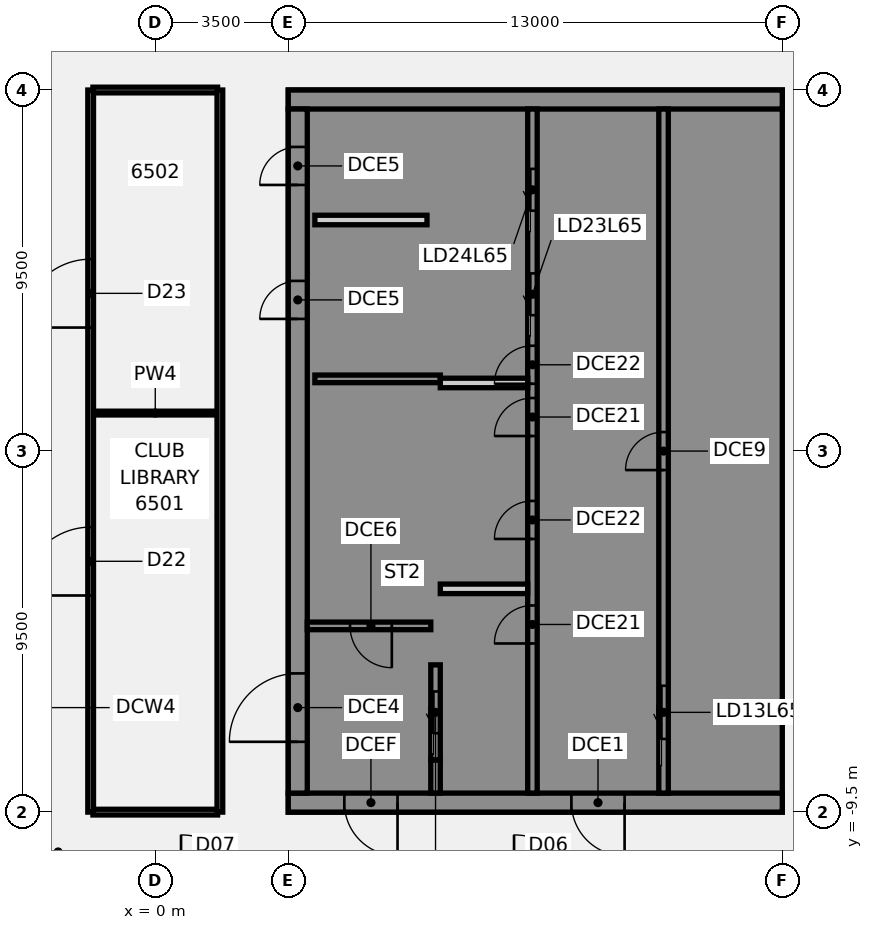
"""IFC4 building model, lengths in metres.
Left out: names, types, materials, properties, quantities, classifications, styles, units other than length and angle.
Written with IfcOpenShell. Run it as: python <this file> out.ifc"""

import sys

from ifc_helpers import new_model, si_unit, direction, frame, frame_2d, origin, place, context, subcontext, project, spatial, polyline, rectangle, outline, extrude, element, fill, save


model = new_model("IFC4")
c1 = context("Model", 3, precision=1e-05, world=origin(), true_north=direction((0.0, 1.0)))
c2 = subcontext(c1, "Body", "Model", "MODEL_VIEW")
j1 = project(units=[si_unit("LENGTHUNIT", "METRE"), si_unit("PLANEANGLEUNIT", "RADIAN")], contexts=[c1])
p1 = place(None, origin())
s1 = spatial("IfcSite", under=j1, at=p1, CompositionType="ELEMENT")
p2 = place(p1, origin())
s2 = spatial("IfcBuilding", under=s1, at=p2, CompositionType="ELEMENT")
p3 = place(p2, frame((0.0, 0.0, 256.8)))
s3 = spatial("IfcBuildingStorey", under=s2, at=p3, CompositionType="ELEMENT", Elevation=256.8)
p4 = place(p3, frame((-1.64, -9.5, 0.0), z_axis=(0.0, 0.0, 1.0), x_axis=(1.0, 0.0, 0.0)))
e1 = element("IfcWall", 1, at=p4, inside=s3, PredefinedType="PARTITIONING", context=c2, shape_type="SweptSolid", body=[
    extrude(rectangle(XDim=3.28, YDim=0.15, at=frame_2d((1.64, 0.0))), origin(), (0.0, 0.0, 1.0), 2.864),
])
p5 = place(p3, frame((-1.64, 1.0, 0.0), z_axis=(0.0, 0.0, 1.0), x_axis=(1.0, 0.0, 0.0)))
e2 = element("IfcWall", 2, at=p5, inside=s3, PredefinedType="PARTITIONING", context=c2, shape_type="SweptSolid", body=[
    extrude(rectangle(XDim=3.28, YDim=0.1, at=frame_2d((1.64, 0.0))), origin(), (0.0, 0.0, 1.0), 2.864),
])
p6 = place(p3, frame((-1.64, 9.5, 0.0), z_axis=(0.0, 0.0, 1.0), x_axis=(1.0, 0.0, 0.0)))
e3 = element("IfcWall", 3, at=p6, inside=s3, PredefinedType="PARTITIONING", context=c2, shape_type="SweptSolid", body=[
    extrude(rectangle(XDim=3.28, YDim=0.15, at=frame_2d((1.64, 0.0))), origin(), (0.0, 0.0, 1.0), 2.864),
])
p7 = place(p3, frame((-1.7, -9.5, 0.0), z_axis=(0.0, 0.0, 1.0), x_axis=(0.0, 1.0, 0.0)))
e4 = element("IfcWall", 4, at=p7, inside=s3, PredefinedType="PARTITIONING", context=c2, shape_type="SweptSolid", body=[
    extrude(rectangle(XDim=19.0, YDim=0.15, at=frame_2d((9.5, 0.0))), origin(), (0.0, 0.0, 1.0), 2.864),
])
p8 = place(p7, frame((5.7, 0.0, 0.0)))
e5 = element("IfcOpeningElement", 5, at=p8, cuts=e4, PredefinedType="OPENING", context=c2, shape_type="SweptSolid", body=[
    extrude(rectangle(XDim=1.8, YDim=2.1, at=frame_2d((0.9, 1.05))), frame((0.0, 0.085, 0.0), z_axis=(0.0, -1.0, 0.0), x_axis=(1.0, 0.0, 0.0)), (0.0, 0.0, 1.0), 0.17),
])
p9 = place(p7, frame((12.75, 0.0, 0.0)))
e6 = element("IfcOpeningElement", 6, at=p9, cuts=e4, PredefinedType="OPENING", context=c2, shape_type="SweptSolid", body=[
    extrude(rectangle(XDim=1.8, YDim=2.1, at=frame_2d((0.9, 1.05))), frame((0.0, 0.085, 0.0), z_axis=(0.0, -1.0, 0.0), x_axis=(1.0, 0.0, 0.0)), (0.0, 0.0, 1.0), 0.17),
])
p10 = place(p3, frame((1.7, -9.5, 0.0), z_axis=(0.0, 0.0, 1.0), x_axis=(0.0, 1.0, 0.0)))
e7 = element("IfcWall", 7, at=p10, inside=s3, PredefinedType="PARTITIONING", context=c2, shape_type="SweptSolid", body=[
    extrude(rectangle(XDim=19.0, YDim=0.15, at=frame_2d((9.5, 0.0))), origin(), (0.0, 0.0, 1.0), 2.864),
])
p11 = place(p3, frame((16.5, -9.25, 0.0), z_axis=(0.0, 0.0, 1.0), x_axis=(-1.0, 0.0, 0.0)))
e8 = element("IfcWall", 8, at=p11, inside=s3, PredefinedType="SHEAR", context=c2, shape_type="SweptSolid", body=[
    extrude(rectangle(XDim=13.0, YDim=0.5, at=frame_2d((6.5, 0.0))), origin(), (0.0, 0.0, 1.0), 3.46),
])
p12 = place(p11, frame((4.15, 0.0, 0.0)))
e9 = element("IfcOpeningElement", 9, at=p12, cuts=e8, PredefinedType="OPENING", context=c2, shape_type="SweptSolid", body=[
    extrude(rectangle(XDim=1.4, YDim=2.1, at=frame_2d((0.7, 1.05))), frame((0.0, 0.26, 0.0), z_axis=(0.0, -1.0, 0.0), x_axis=(1.0, 0.0, 0.0)), (0.0, 0.0, 1.0), 0.52),
])
p13 = place(p11, frame((10.125, 0.0, 0.0)))
e10 = element("IfcOpeningElement", 10, at=p13, cuts=e8, PredefinedType="OPENING", context=c2, shape_type="SweptSolid", body=[
    extrude(rectangle(XDim=1.4, YDim=2.1, at=frame_2d((0.7, 1.05))), frame((0.0, 0.26, 0.0), z_axis=(0.0, -1.0, 0.0), x_axis=(1.0, 0.0, 0.0)), (0.0, 0.0, 1.0), 0.52),
])
p14 = place(p3, origin())
e11 = element("IfcWall", 11, at=p14, inside=s3, PredefinedType="SHEAR", context=c2, shape_type="SweptSolid", body=[
    extrude(outline(polyline([(13.5, -8.125), (13.5, -9.0), (16.0, -9.0), (16.5, -9.0), (16.5, 9.0), (16.0, 9.0), (13.5, 9.0), (13.5, 8.125), (16.0, 8.125), (16.0, 5.625), (13.5, 5.625), (13.5, 5.375), (16.0, 5.375), (16.0, -5.375), (13.5, -5.375), (13.5, -5.625), (16.0, -5.625), (16.0, -8.125), (13.5, -8.125)])), origin(), (0.0, 0.0, 1.0), 3.46),
])
p15 = place(p3, frame((16.5, 9.25, 0.0), z_axis=(0.0, 0.0, 1.0), x_axis=(-1.0, 0.0, 0.0)))
e12 = element("IfcWall", 12, at=p15, inside=s3, PredefinedType="SHEAR", context=c2, shape_type="SweptSolid", body=[
    extrude(rectangle(XDim=13.0, YDim=0.5, at=frame_2d((6.5, 0.0))), origin(), (0.0, 0.0, 1.0), 3.46),
])
p16 = place(p3, origin())
e13 = element("IfcWall", 13, at=p16, inside=s3, PredefinedType="SHEAR", context=c2, shape_type="SweptSolid", body=[
    extrude(outline(polyline([(9.8, -5.375), (7.5, -5.375), (7.5, 2.625), (9.8, 2.625), (9.8, 2.875), (7.5, 2.875), (7.5, 5.375), (9.8, 5.375), (9.8, 5.625), (7.5, 5.625), (7.5, 8.125), (9.8, 8.125), (9.8, 9.0), (7.5, 9.0), (7.25, 9.0), (7.25, -5.625), (7.5, -5.625), (9.8, -5.625), (9.8, -5.375)])), origin(), (0.0, 0.0, 1.0), 3.46),
])
p17 = place(p3, origin())
e14 = element("IfcWall", 14, at=p17, inside=s3, PredefinedType="SHEAR", context=c2, shape_type="SweptSolid", body=[
    extrude(outline(polyline([(7.5, -8.125), (7.5, -9.0), (9.8, -9.0), (9.8, -8.125), (9.8, -5.625), (9.55, -5.625), (9.55, -8.125), (7.5, -8.125)])), origin(), (0.0, 0.0, 1.0), 3.46),
])
p18 = place(p3, frame((7.375, -9.0, 0.0), z_axis=(0.0, 0.0, 1.0), x_axis=(0.0, 1.0, 0.0)))
e15 = element("IfcWall", 15, at=p18, inside=s3, PredefinedType="SHEAR", context=c2, shape_type="SweptSolid", body=[
    extrude(rectangle(XDim=0.875, YDim=0.25, at=frame_2d((0.438, 0.0))), origin(), (0.0, 0.0, 1.0), 3.46),
])
p19 = place(p3, frame((7.5, 1.9, 0.0), z_axis=(0.0, 0.0, 1.0), x_axis=(-1.0, 0.0, 0.0)))
e16 = element("IfcWall", 16, at=p19, inside=s3, PredefinedType="SHEAR", context=c2, shape_type="SweptSolid", body=[
    extrude(rectangle(XDim=3.3, YDim=0.2, at=frame_2d((1.65, 0.0))), origin(), (0.0, 0.0, 1.0), 3.46),
])
p20 = place(p3, frame((13.375, -9.0, 0.0), z_axis=(0.0, 0.0, 1.0), x_axis=(0.0, 1.0, 0.0)))
e17 = element("IfcWall", 17, at=p20, inside=s3, PredefinedType="SHEAR", context=c2, shape_type="SweptSolid", body=[
    extrude(rectangle(XDim=18.0, YDim=0.25, at=frame_2d((9.0, 0.0))), origin(), (0.0, 0.0, 1.0), 3.46),
])
p21 = place(p20, frame((1.425, 0.0, 0.0)))
e18 = element("IfcOpeningElement", 18, at=p21, cuts=e17, PredefinedType="OPENING", context=c2, shape_type="SweptSolid", body=[
    extrude(rectangle(XDim=1.4, YDim=2.1, at=frame_2d((0.7, 1.05))), frame((0.0, 0.135, 0.0), z_axis=(0.0, -1.0, 0.0), x_axis=(1.0, 0.0, 0.0)), (0.0, 0.0, 1.0), 0.27),
])
p22 = place(p20, frame((8.5, 0.0, 0.0)))
e19 = element("IfcOpeningElement", 19, at=p22, cuts=e17, PredefinedType="OPENING", context=c2, shape_type="SweptSolid", body=[
    extrude(rectangle(XDim=1.0, YDim=2.1, at=frame_2d((0.5, 1.05))), frame((0.0, 0.135, 0.0), z_axis=(0.0, -1.0, 0.0), x_axis=(1.0, 0.0, 0.0)), (0.0, 0.0, 1.0), 0.27),
])
p23 = place(p3, frame((9.925, -9.0, 0.0), z_axis=(0.0, 0.0, 1.0), x_axis=(0.0, 1.0, 0.0)))
e20 = element("IfcWall", 20, at=p23, inside=s3, PredefinedType="SHEAR", context=c2, shape_type="SweptSolid", body=[
    extrude(rectangle(XDim=18.0, YDim=0.25, at=frame_2d((9.0, 0.0))), origin(), (0.0, 0.0, 1.0), 3.46),
])
p24 = place(p23, frame((12.575, 0.0, 0.0)))
e21 = element("IfcOpeningElement", 21, at=p24, cuts=e20, PredefinedType="OPENING", context=c2, shape_type="SweptSolid", body=[
    extrude(rectangle(XDim=1.1, YDim=2.1, at=frame_2d((0.55, 1.05))), frame((0.0, 0.135, 0.0), z_axis=(0.0, -1.0, 0.0), x_axis=(1.0, 0.0, 0.0)), (0.0, 0.0, 1.0), 0.27),
])
p25 = place(p23, frame((15.325, 0.0, 0.0)))
e22 = element("IfcOpeningElement", 22, at=p25, cuts=e20, PredefinedType="OPENING", context=c2, shape_type="SweptSolid", body=[
    extrude(rectangle(XDim=1.1, YDim=2.1, at=frame_2d((0.55, 1.05))), frame((0.0, 0.135, 0.0), z_axis=(0.0, -1.0, 0.0), x_axis=(1.0, 0.0, 0.0)), (0.0, 0.0, 1.0), 0.27),
])
p26 = place(p23, frame((3.938, 0.0, 0.0)))
e23 = element("IfcOpeningElement", 23, at=p26, cuts=e20, PredefinedType="OPENING", context=c2, shape_type="SweptSolid", body=[
    extrude(rectangle(XDim=1.0, YDim=2.1, at=frame_2d((0.5, 1.05))), frame((0.0, 0.135, 0.0), z_axis=(0.0, -1.0, 0.0), x_axis=(1.0, 0.0, 0.0)), (0.0, 0.0, 1.0), 0.27),
])
p27 = place(p23, frame((6.688, 0.0, 0.0)))
e24 = element("IfcOpeningElement", 24, at=p27, cuts=e20, PredefinedType="OPENING", context=c2, shape_type="SweptSolid", body=[
    extrude(rectangle(XDim=1.0, YDim=2.1, at=frame_2d((0.5, 1.05))), frame((0.0, 0.135, 0.0), z_axis=(0.0, -1.0, 0.0), x_axis=(1.0, 0.0, 0.0)), (0.0, 0.0, 1.0), 0.27),
])
p28 = place(p23, frame((9.396, 0.0, 0.0)))
e25 = element("IfcOpeningElement", 25, at=p28, cuts=e20, PredefinedType="OPENING", context=c2, shape_type="SweptSolid", body=[
    extrude(rectangle(XDim=1.0, YDim=2.1, at=frame_2d((0.5, 1.05))), frame((0.0, 0.135, 0.0), z_axis=(0.0, -1.0, 0.0), x_axis=(1.0, 0.0, 0.0)), (0.0, 0.0, 1.0), 0.27),
])
p29 = place(p23, frame((10.771, 0.0, 0.0)))
e26 = element("IfcOpeningElement", 26, at=p29, cuts=e20, PredefinedType="OPENING", context=c2, shape_type="SweptSolid", body=[
    extrude(rectangle(XDim=1.0, YDim=2.1, at=frame_2d((0.5, 1.05))), frame((0.0, 0.135, 0.0), z_axis=(0.0, -1.0, 0.0), x_axis=(1.0, 0.0, 0.0)), (0.0, 0.0, 1.0), 0.27),
])
p30 = place(p3, frame((7.375, -8.125, 0.0), z_axis=(0.0, 0.0, 1.0), x_axis=(0.0, 1.0, 0.0)))
e27 = element("IfcWall", 27, at=p30, inside=s3, PredefinedType="SHEAR", context=c2, shape_type="SweptSolid", body=[
    extrude(rectangle(XDim=2.5, YDim=0.25, at=frame_2d((1.25, 0.0))), origin(), (0.0, 0.0, 1.0), 3.46),
])
p31 = place(p30, frame((0.7, 0.0, 0.0)))
e28 = element("IfcOpeningElement", 28, at=p31, cuts=e27, PredefinedType="OPENING", context=c2, shape_type="SweptSolid", body=[
    extrude(rectangle(XDim=1.1, YDim=2.1, at=frame_2d((0.55, 1.05))), frame((0.0, 0.135, 0.0), z_axis=(0.0, -1.0, 0.0), x_axis=(1.0, 0.0, 0.0)), (0.0, 0.0, 1.0), 0.27),
])
p32 = place(p3, frame((3.75, -9.0, 0.0), z_axis=(0.0, 0.0, 1.0), x_axis=(0.0, 1.0, 0.0)))
e29 = element("IfcWall", 29, at=p32, inside=s3, PredefinedType="SHEAR", context=c2, shape_type="SweptSolid", body=[
    extrude(rectangle(XDim=18.0, YDim=0.5, at=frame_2d((9.0, 0.0))), origin(), (0.0, 0.0, 1.0), 3.46),
])
p33 = place(p32, frame((1.35, 0.0, 0.0)))
e30 = element("IfcOpeningElement", 30, at=p33, cuts=e29, PredefinedType="OPENING", context=c2, shape_type="SweptSolid", body=[
    extrude(rectangle(XDim=1.8, YDim=2.1, at=frame_2d((0.9, 1.05))), frame((0.0, 0.26, 0.0), z_axis=(0.0, -1.0, 0.0), x_axis=(1.0, 0.0, 0.0)), (0.0, 0.0, 1.0), 0.52),
])
p34 = place(p32, frame((12.478, 0.0, 0.0)))
e31 = element("IfcOpeningElement", 31, at=p34, cuts=e29, PredefinedType="OPENING", context=c2, shape_type="SweptSolid", body=[
    extrude(rectangle(XDim=1.0, YDim=2.1, at=frame_2d((0.5, 1.05))), frame((0.0, 0.26, 0.0), z_axis=(0.0, -1.0, 0.0), x_axis=(1.0, 0.0, 0.0)), (0.0, 0.0, 1.0), 0.52),
])
p35 = place(p32, frame((16.002, 0.0, 0.0)))
e32 = element("IfcOpeningElement", 32, at=p35, cuts=e29, PredefinedType="OPENING", context=c2, shape_type="SweptSolid", body=[
    extrude(rectangle(XDim=1.0, YDim=2.1, at=frame_2d((0.5, 1.05))), frame((0.0, 0.26, 0.0), z_axis=(0.0, -1.0, 0.0), x_axis=(1.0, 0.0, 0.0)), (0.0, 0.0, 1.0), 0.52),
])
p36 = place(p3, frame((7.15, 6.08, 0.0), z_axis=(0.0, 0.0, 1.0), x_axis=(-1.0, 0.0, 0.0)))
e33 = element("IfcWall", 33, at=p36, inside=s3, PredefinedType="PARTITIONING", context=c2, shape_type="SweptSolid", body=[
    extrude(rectangle(XDim=2.95, YDim=0.25, at=frame_2d((1.475, 0.0))), origin(), (0.0, 0.0, 1.0), 3.46),
])
p37 = place(p3, frame((7.25, -4.6, 0.0), z_axis=(0.0, 0.0, 1.0), x_axis=(-1.0, 0.0, 0.0)))
e34 = element("IfcWall", 34, at=p37, inside=s3, PredefinedType="SHEAR", context=c2, shape_type="SweptSolid", body=[
    extrude(rectangle(XDim=3.25, YDim=0.2, at=frame_2d((1.625, 0.0))), origin(), (0.0, 0.0, 1.0), 3.46),
])
p38 = place(p37, frame((1.025, 0.0, 0.0)))
e35 = element("IfcOpeningElement", 35, at=p38, cuts=e34, PredefinedType="OPENING", context=c2, shape_type="SweptSolid", body=[
    extrude(rectangle(XDim=1.1, YDim=2.1, at=frame_2d((0.55, 1.05))), frame((0.0, 0.11, 0.0), z_axis=(0.0, -1.0, 0.0), x_axis=(1.0, 0.0, 0.0)), (0.0, 0.0, 1.0), 0.22),
])
for number, where, z_axis, x_axis in (
    (36, (9.8, -3.625, 0.0), (0.0, 0.0, 1.0), (-1.0, 0.0, 0.0)),
    (37, (9.8, 1.792, 0.0), (0.0, 0.0, 1.0), (-1.0, 0.0, 0.0)),
):
    element("IfcWall", number, at=place(p3, frame(where, z_axis=z_axis, x_axis=x_axis)), inside=s3, PredefinedType="PARTITIONING", context=c2, shape_type="SweptSolid", body=[
        extrude(rectangle(XDim=2.3, YDim=0.25, at=frame_2d((1.15, 0.0))), origin(), (0.0, 0.0, 1.0), 3.46),
    ])
p39 = place(p8, frame((1.8, 0.0, 0.0), z_axis=(0.0, 0.0, 1.0), x_axis=(-1.0, 0.0, 0.0)))
e38 = element("IfcDoor", 38, at=p39, inside=s3, OperationType="DOUBLE_DOOR_SINGLE_SWING", PredefinedType="DOOR", context=c2, shape_type="SweptSolid", body=[
    extrude(rectangle(XDim=1.8, YDim=2.1, at=frame_2d((0.9, 1.05))), frame((0.0, 0.025, 0.0), z_axis=(0.0, -1.0, 0.0), x_axis=(1.0, 0.0, 0.0)), (0.0, 0.0, 1.0), 0.05),
])
fill(e5, e38)
p40 = place(p9, frame((1.8, 0.0, 0.0), z_axis=(0.0, 0.0, 1.0), x_axis=(-1.0, 0.0, 0.0)))
e39 = element("IfcDoor", 39, at=p40, inside=s3, OperationType="DOUBLE_DOOR_SINGLE_SWING", PredefinedType="DOOR", context=c2, shape_type="SweptSolid", body=[
    extrude(rectangle(XDim=1.8, YDim=2.1, at=frame_2d((0.9, 1.05))), frame((0.0, 0.025, 0.0), z_axis=(0.0, -1.0, 0.0), x_axis=(1.0, 0.0, 0.0)), (0.0, 0.0, 1.0), 0.05),
])
fill(e6, e39)
p41 = place(p12, origin())
e40 = element("IfcDoor", 40, at=p41, inside=s3, OperationType="SINGLE_SWING_LEFT", PredefinedType="DOOR", context=c2, shape_type="SweptSolid", body=[
    extrude(rectangle(XDim=1.4, YDim=2.1, at=frame_2d((0.7, 1.05))), frame((0.0, 0.025, 0.0), z_axis=(0.0, -1.0, 0.0), x_axis=(1.0, 0.0, 0.0)), (0.0, 0.0, 1.0), 0.05),
])
fill(e9, e40)
p42 = place(p13, origin())
e41 = element("IfcDoor", 41, at=p42, inside=s3, OperationType="SINGLE_SWING_LEFT", PredefinedType="DOOR", context=c2, shape_type="SweptSolid", body=[
    extrude(rectangle(XDim=1.4, YDim=2.1, at=frame_2d((0.7, 1.05))), frame((0.0, 0.025, 0.0), z_axis=(0.0, -1.0, 0.0), x_axis=(1.0, 0.0, 0.0)), (0.0, 0.0, 1.0), 0.05),
])
fill(e10, e41)
p43 = place(p33, origin())
e42 = element("IfcDoor", 42, at=p43, inside=s3, OperationType="SINGLE_SWING_LEFT", PredefinedType="DOOR", context=c2, shape_type="SweptSolid", body=[
    extrude(rectangle(XDim=1.8, YDim=2.1, at=frame_2d((0.9, 1.05))), frame((0.0, 0.025, 0.0), z_axis=(0.0, -1.0, 0.0), x_axis=(1.0, 0.0, 0.0)), (0.0, 0.0, 1.0), 0.05),
])
fill(e30, e42)
p44 = place(p34, origin())
e43 = element("IfcDoor", 43, at=p44, inside=s3, OperationType="SINGLE_SWING_LEFT", PredefinedType="DOOR", context=c2, shape_type="SweptSolid", body=[
    extrude(rectangle(XDim=1.0, YDim=2.1, at=frame_2d((0.5, 1.05))), frame((0.0, -0.175, 0.0), z_axis=(0.0, -1.0, 0.0), x_axis=(1.0, 0.0, 0.0)), (0.0, 0.0, 1.0), 0.05),
])
fill(e31, e43)
p45 = place(p35, origin())
e44 = element("IfcDoor", 44, at=p45, inside=s3, OperationType="SINGLE_SWING_LEFT", PredefinedType="DOOR", context=c2, shape_type="SweptSolid", body=[
    extrude(rectangle(XDim=1.0, YDim=2.1, at=frame_2d((0.5, 1.05))), frame((0.0, -0.175, 0.0), z_axis=(0.0, -1.0, 0.0), x_axis=(1.0, 0.0, 0.0)), (0.0, 0.0, 1.0), 0.05),
])
fill(e32, e44)
p46 = place(p38, origin())
e45 = element("IfcDoor", 45, at=p46, inside=s3, OperationType="SINGLE_SWING_LEFT", PredefinedType="DOOR", context=c2, shape_type="SweptSolid", body=[
    extrude(rectangle(XDim=1.1, YDim=2.1, at=frame_2d((0.55, 1.05))), frame((0.0, 0.025, 0.0), z_axis=(0.0, -1.0, 0.0), x_axis=(1.0, 0.0, 0.0)), (0.0, 0.0, 1.0), 0.05),
])
fill(e35, e45)
p47 = place(p21, origin())
e46 = element("IfcDoor", 46, at=p47, inside=s3, OperationType="SLIDING_TO_LEFT", PredefinedType="DOOR", context=c2, shape_type="SweptSolid", body=[
    extrude(rectangle(XDim=1.4, YDim=2.1, at=frame_2d((0.7, 1.05))), frame((0.0, 0.025, 0.0), z_axis=(0.0, -1.0, 0.0), x_axis=(1.0, 0.0, 0.0)), (0.0, 0.0, 1.0), 0.05),
])
fill(e18, e46)
p48 = place(p31, origin())
e47 = element("IfcDoor", 47, at=p48, inside=s3, OperationType="SLIDING_TO_LEFT", PredefinedType="DOOR", context=c2, shape_type="SweptSolid", body=[
    extrude(rectangle(XDim=1.1, YDim=2.1, at=frame_2d((0.55, 1.05))), frame((0.0, 0.025, 0.0), z_axis=(0.0, -1.0, 0.0), x_axis=(1.0, 0.0, 0.0)), (0.0, 0.0, 1.0), 0.05),
])
fill(e28, e47)
p49 = place(p24, origin())
e48 = element("IfcDoor", 48, at=p49, inside=s3, OperationType="SLIDING_TO_LEFT", PredefinedType="DOOR", context=c2, shape_type="SweptSolid", body=[
    extrude(rectangle(XDim=1.1, YDim=2.1, at=frame_2d((0.55, 1.05))), frame((0.0, 0.025, 0.0), z_axis=(0.0, -1.0, 0.0), x_axis=(1.0, 0.0, 0.0)), (0.0, 0.0, 1.0), 0.05),
])
fill(e21, e48)
p50 = place(p25, origin())
e49 = element("IfcDoor", 49, at=p50, inside=s3, OperationType="SLIDING_TO_LEFT", PredefinedType="DOOR", context=c2, shape_type="SweptSolid", body=[
    extrude(rectangle(XDim=1.1, YDim=2.1, at=frame_2d((0.55, 1.05))), frame((0.0, 0.025, 0.0), z_axis=(0.0, -1.0, 0.0), x_axis=(1.0, 0.0, 0.0)), (0.0, 0.0, 1.0), 0.05),
])
fill(e22, e49)
p51 = place(p22, origin())
e50 = element("IfcDoor", 50, at=p51, inside=s3, OperationType="SINGLE_SWING_LEFT", PredefinedType="DOOR", context=c2, shape_type="SweptSolid", body=[
    extrude(rectangle(XDim=1.0, YDim=2.1, at=frame_2d((0.5, 1.05))), frame((0.0, 0.025, 0.0), z_axis=(0.0, -1.0, 0.0), x_axis=(1.0, 0.0, 0.0)), (0.0, 0.0, 1.0), 0.05),
])
fill(e19, e50)
p52 = place(p26, origin())
e51 = element("IfcDoor", 51, at=p52, inside=s3, OperationType="SINGLE_SWING_LEFT", PredefinedType="DOOR", context=c2, shape_type="SweptSolid", body=[
    extrude(rectangle(XDim=1.0, YDim=2.1, at=frame_2d((0.5, 1.05))), frame((0.0, 0.025, 0.0), z_axis=(0.0, -1.0, 0.0), x_axis=(1.0, 0.0, 0.0)), (0.0, 0.0, 1.0), 0.05),
])
fill(e23, e51)
p53 = place(p27, origin())
e52 = element("IfcDoor", 52, at=p53, inside=s3, OperationType="SINGLE_SWING_LEFT", PredefinedType="DOOR", context=c2, shape_type="SweptSolid", body=[
    extrude(rectangle(XDim=1.0, YDim=2.1, at=frame_2d((0.5, 1.05))), frame((0.0, 0.025, 0.0), z_axis=(0.0, -1.0, 0.0), x_axis=(1.0, 0.0, 0.0)), (0.0, 0.0, 1.0), 0.05),
])
fill(e24, e52)
p54 = place(p28, origin())
e53 = element("IfcDoor", 53, at=p54, inside=s3, OperationType="SINGLE_SWING_LEFT", PredefinedType="DOOR", context=c2, shape_type="SweptSolid", body=[
    extrude(rectangle(XDim=1.0, YDim=2.1, at=frame_2d((0.5, 1.05))), frame((0.0, 0.025, 0.0), z_axis=(0.0, -1.0, 0.0), x_axis=(1.0, 0.0, 0.0)), (0.0, 0.0, 1.0), 0.05),
])
fill(e25, e53)
p55 = place(p29, origin())
e54 = element("IfcDoor", 54, at=p55, inside=s3, OperationType="SINGLE_SWING_LEFT", PredefinedType="DOOR", context=c2, shape_type="SweptSolid", body=[
    extrude(rectangle(XDim=1.0, YDim=2.1, at=frame_2d((0.5, 1.05))), frame((0.0, 0.025, 0.0), z_axis=(0.0, -1.0, 0.0), x_axis=(1.0, 0.0, 0.0)), (0.0, 0.0, 1.0), 0.05),
])
fill(e26, e54)
save(model, sys.argv[1])
